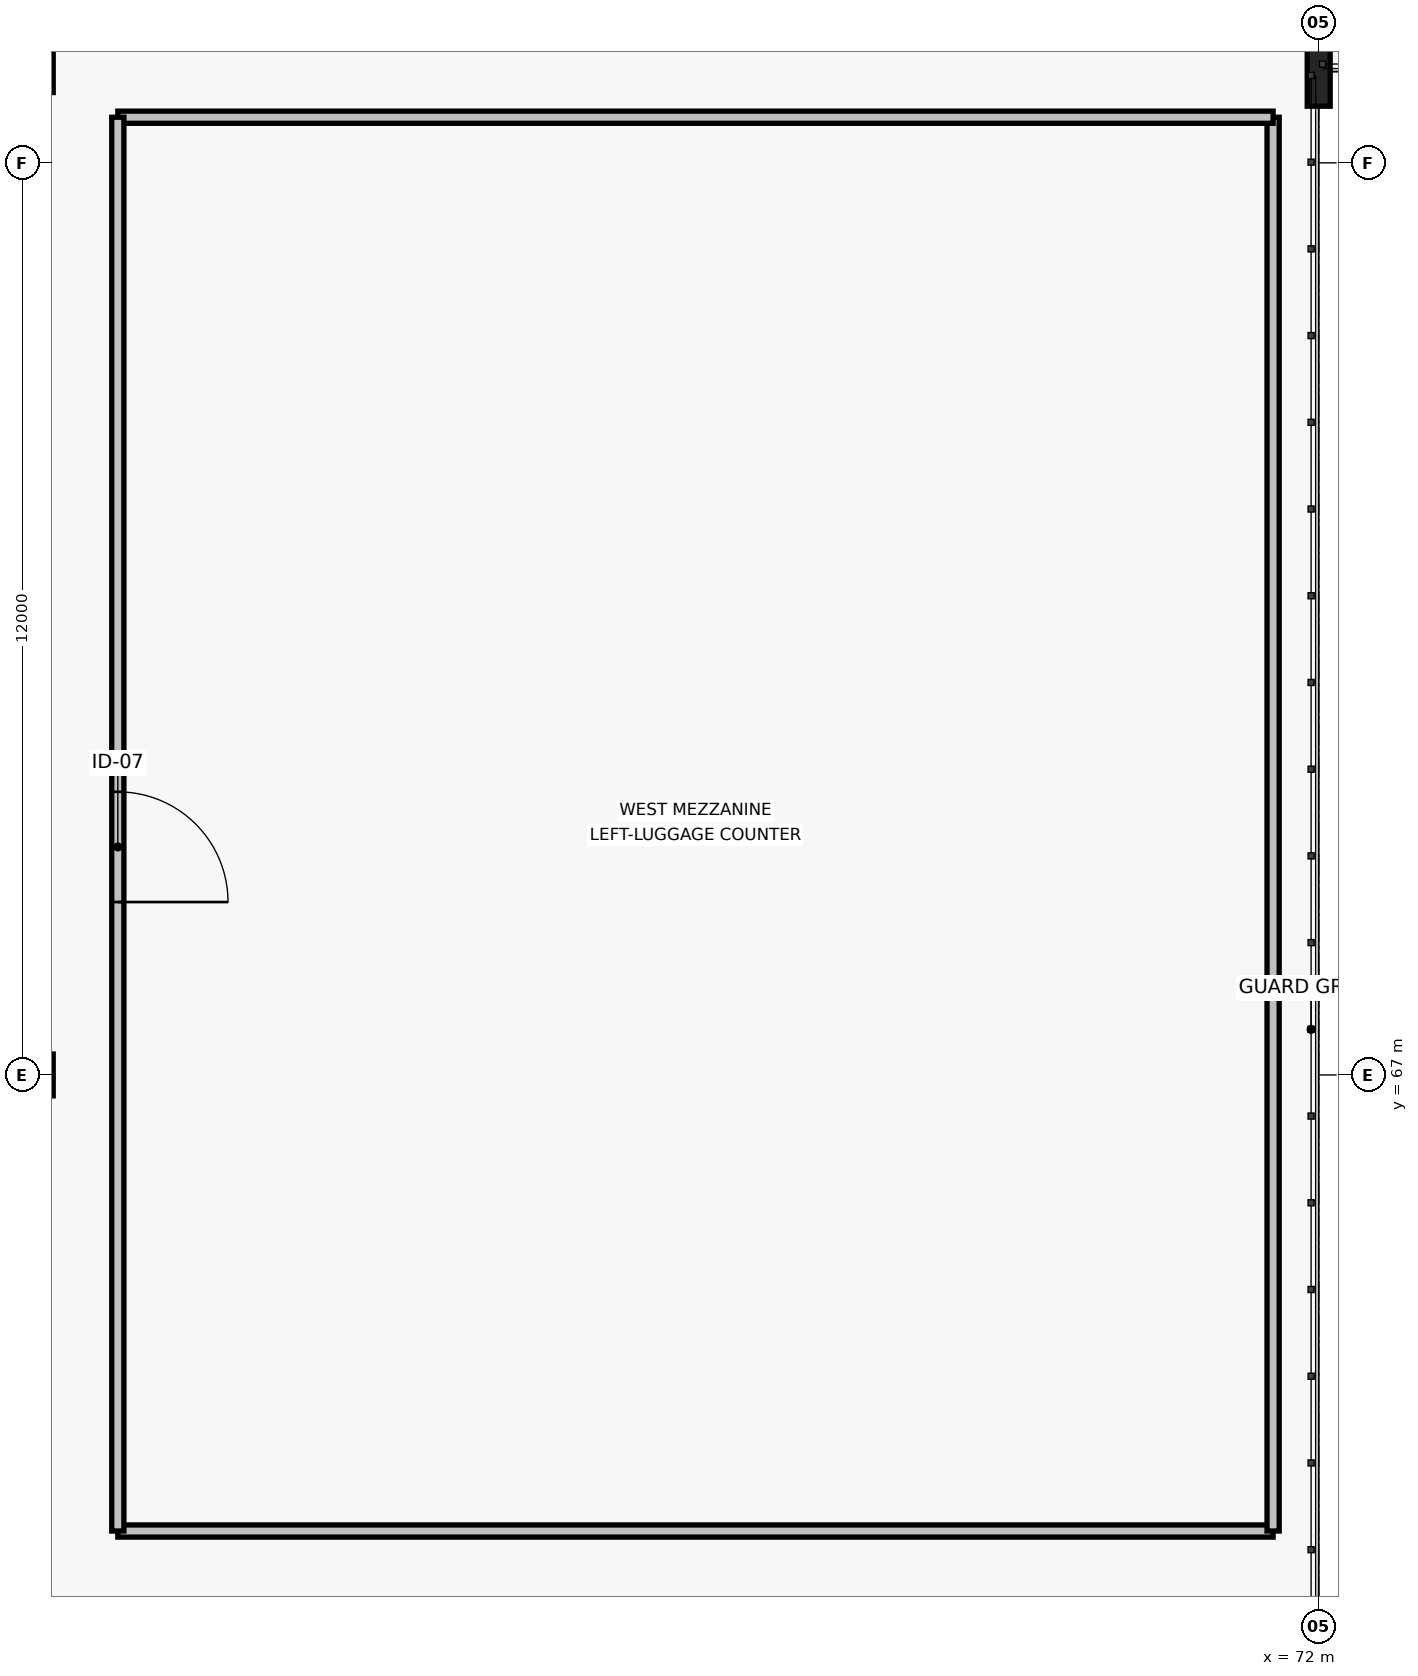
"""IFC4 building model, lengths in metres.
Left out: names, types, materials, properties, quantities, classifications, styles, units other than length and angle.
Written with IfcOpenShell. Run it as: python <this file> out.ifc"""

import sys

from ifc_helpers import new_model, si_unit, direction, frame, frame_2d, origin, origin_2d, place, context, subcontext, project, spatial, rectangle, i_section, extrude, element, fill, save


model = new_model("IFC4")
c1 = context("Model", 3, precision=1e-05, world=origin(), true_north=direction((0.0, 1.0)))
c2 = subcontext(c1, "Body", "Model", "MODEL_VIEW")
j1 = project(units=[si_unit("LENGTHUNIT", "METRE"), si_unit("PLANEANGLEUNIT", "RADIAN")], contexts=[c1])
p1 = place(None, origin())
s1 = spatial("IfcSite", under=j1, at=p1, CompositionType="ELEMENT")
p2 = place(p1, origin())
s2 = spatial("IfcBuilding", under=s1, at=p2, CompositionType="ELEMENT")
p3 = place(p2, frame((0.0, 0.0, 5.4)))
s3 = spatial("IfcBuildingStorey", under=s2, at=p3, CompositionType="ELEMENT", Elevation=5.4)
for number, where, z_axis, x_axis in (
    (1, (55.2, 67.0, 0.0), (0.0, 0.0, 1.0), (1.0, 0.0, 0.0)),
    (2, (55.2, 80.2, 0.0), (0.0, 0.0, 1.0), (1.0, 0.0, 0.0)),
):
    element("IfcColumn", number, at=place(p3, frame(where, z_axis=z_axis, x_axis=x_axis)), inside=s3, PredefinedType="COLUMN", context=c2, shape_type="SweptSolid", body=[
        extrude(i_section(OverallWidth=0.3, OverallDepth=0.55, WebThickness=0.015, FlangeThickness=0.029, FilletRadius=0.027, at=origin_2d()), origin(), (0.0, 0.0, 1.0), 5.4),
    ])
p4 = place(p3, frame((72.0, 80.2, 0.0), z_axis=(0.0, 0.0, 1.0), x_axis=(1.0, 0.0, 0.0)))
e3 = element("IfcColumn", 3, at=p4, inside=s3, PredefinedType="COLUMN", context=c2, shape_type="SweptSolid", body=[
    extrude(i_section(OverallWidth=0.302, OverallDepth=0.91, WebThickness=0.021, FlangeThickness=0.04, FilletRadius=0.03, at=origin_2d()), origin(), (0.0, 0.0, 1.0), 5.4),
])
p5 = place(p3, frame((56.2, 61.0, 0.0), z_axis=(0.0, 0.0, 1.0), x_axis=(1.0, 0.0, 0.0)))
e4 = element("IfcWall", 4, at=p5, inside=s3, PredefinedType="PARTITIONING", context=c2, shape_type="SweptSolid", body=[
    extrude(rectangle(XDim=15.2, YDim=0.16, at=frame_2d((7.6, 0.0))), origin(), (0.0, 0.0, 1.0), 5.16),
])
p6 = place(p3, frame((71.4, 61.0, 0.0), z_axis=(0.0, 0.0, 1.0), x_axis=(0.0, 1.0, 0.0)))
e5 = element("IfcWall", 5, at=p6, inside=s3, PredefinedType="PARTITIONING", context=c2, shape_type="SweptSolid", body=[
    extrude(rectangle(XDim=18.6, YDim=0.16, at=frame_2d((9.3, 0.0))), origin(), (0.0, 0.0, 1.0), 3.915),
])
p7 = place(p3, frame((71.4, 79.6, 0.0), z_axis=(0.0, 0.0, 1.0), x_axis=(-1.0, 0.0, 0.0)))
e6 = element("IfcWall", 6, at=p7, inside=s3, PredefinedType="PARTITIONING", context=c2, shape_type="SweptSolid", body=[
    extrude(rectangle(XDim=15.2, YDim=0.16, at=frame_2d((7.6, 0.0))), origin(), (0.0, 0.0, 1.0), 4.485),
])
p8 = place(p3, frame((56.2, 79.6, 0.0), z_axis=(0.0, 0.0, 1.0), x_axis=(0.0, -1.0, 0.0)))
e7 = element("IfcWall", 7, at=p8, inside=s3, PredefinedType="PARTITIONING", context=c2, shape_type="SweptSolid", body=[
    extrude(rectangle(XDim=18.6, YDim=0.16, at=frame_2d((9.3, 0.0))), origin(), (0.0, 0.0, 1.0), 5.16),
])
p9 = place(p8, frame((10.325, 0.0, 0.0), z_axis=(0.0, 0.0, 1.0), x_axis=(-1.0, 0.0, 0.0)))
e8 = element("IfcOpeningElement", 8, at=p9, cuts=e7, PredefinedType="OPENING", context=c2, shape_type="SweptSolid", body=[
    extrude(rectangle(XDim=1.45, YDim=2.25, at=frame_2d((0.725, 1.125))), frame((0.0, 0.09, 0.0), z_axis=(0.0, -1.0, 0.0), x_axis=(1.0, 0.0, 0.0)), (0.0, 0.0, 1.0), 0.18),
])
p10 = place(p9, origin())
e9 = element("IfcDoor", 9, at=p10, inside=s3, OperationType="SINGLE_SWING_RIGHT", PredefinedType="DOOR", context=c2, shape_type="SweptSolid", body=[
    extrude(rectangle(XDim=1.45, YDim=2.25, at=frame_2d((0.725, 1.125))), frame((0.0, 0.025, 0.0), z_axis=(0.0, -1.0, 0.0), x_axis=(1.0, 0.0, 0.0)), (0.0, 0.0, 1.0), 0.05),
])
fill(e8, e9)
save(model, sys.argv[1])
